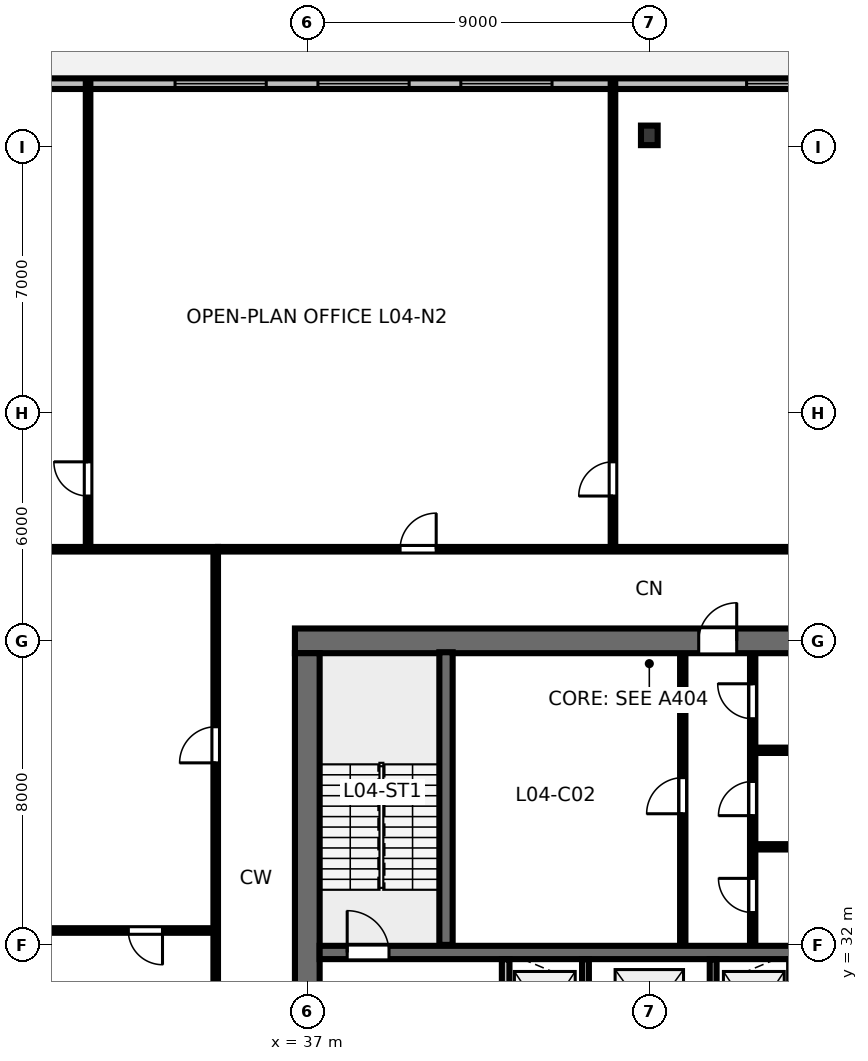
"""IFC4 building model, lengths in metres.
Left out: names, types, materials, properties, quantities, classifications, styles, units other than length and angle.
Written with IfcOpenShell. Run it as: python <this file> out.ifc"""

import sys

from ifc_helpers import new_model, si_unit, direction, frame, frame_2d, origin, origin_2d, place, context, subcontext, project, spatial, rectangle, i_section, extrude, element, fill, save


model = new_model("IFC4")
c1 = context("Model", 3, precision=1e-05, world=origin(), true_north=direction((0.0, 1.0)))
c2 = subcontext(c1, "Body", "Model", "MODEL_VIEW")
j1 = project(units=[si_unit("LENGTHUNIT", "METRE"), si_unit("PLANEANGLEUNIT", "RADIAN")], contexts=[c1])
p1 = place(None, origin())
s1 = spatial("IfcSite", under=j1, at=p1, CompositionType="ELEMENT")
p2 = place(p1, origin())
s2 = spatial("IfcBuilding", under=s1, at=p2, CompositionType="ELEMENT")
p3 = place(p2, frame((0.0, 0.0, 18.5)))
s3 = spatial("IfcBuildingStorey", under=s2, at=p3, CompositionType="ELEMENT", Elevation=18.5)
p4 = place(p3, frame((36.675, 40.0, 0.0), z_axis=(0.0, 0.0, 1.0), x_axis=(1.0, 0.0, 0.0)))
e1 = element("IfcWall", 1, at=p4, inside=s3, PredefinedType="SHEAR", context=c2, shape_type="SweptSolid", body=[
    extrude(rectangle(XDim=18.65, YDim=0.65, at=frame_2d((9.325, 0.0))), origin(), (0.0, 0.0, 1.0), 4.05),
])
p5 = place(p4, frame((10.625, 0.0, 0.0)))
e2 = element("IfcOpeningElement", 2, at=p5, cuts=e1, PredefinedType="OPENING", context=c2, shape_type="SweptSolid", body=[
    extrude(rectangle(XDim=1.0, YDim=2.15, at=frame_2d((0.5, 1.075))), frame((0.0, 0.335, 0.0), z_axis=(0.0, -1.0, 0.0), x_axis=(1.0, 0.0, 0.0)), (0.0, 0.0, 1.0), 0.67),
])
p6 = place(p3, frame((37.0, 24.325, 0.0), z_axis=(0.0, 0.0, 1.0), x_axis=(0.0, 1.0, 0.0)))
e3 = element("IfcWall", 3, at=p6, inside=s3, PredefinedType="SHEAR", context=c2, shape_type="SweptSolid", body=[
    extrude(rectangle(XDim=15.35, YDim=0.65, at=frame_2d((7.675, 0.0))), origin(), (0.0, 0.0, 1.0), 4.05),
])
p7 = place(p6, frame((5.2, 0.0, 0.0)))
e4 = element("IfcOpeningElement", 4, at=p7, cuts=e3, PredefinedType="OPENING", context=c2, shape_type="SweptSolid", body=[
    extrude(rectangle(XDim=1.15, YDim=2.15, at=frame_2d((0.575, 1.075))), frame((0.0, 0.335, 0.0), z_axis=(0.0, -1.0, 0.0), x_axis=(1.0, 0.0, 0.0)), (0.0, 0.0, 1.0), 0.67),
])
p8 = place(p3, frame((37.325, 31.8, 0.0), z_axis=(0.0, 0.0, 1.0), x_axis=(1.0, 0.0, 0.0)))
e5 = element("IfcWall", 5, at=p8, inside=s3, PredefinedType="SHEAR", context=c2, shape_type="SweptSolid", body=[
    extrude(rectangle(XDim=17.35, YDim=0.35, at=frame_2d((8.675, 0.0))), origin(), (0.0, 0.0, 1.0), 4.05),
])
p9 = place(p8, frame((0.725, 0.0, 0.0)))
e6 = element("IfcOpeningElement", 6, at=p9, cuts=e5, PredefinedType="OPENING", context=c2, shape_type="SweptSolid", body=[
    extrude(rectangle(XDim=1.1, YDim=2.15, at=frame_2d((0.55, 1.075))), frame((0.0, 0.185, 0.0), z_axis=(0.0, -1.0, 0.0), x_axis=(1.0, 0.0, 0.0)), (0.0, 0.0, 1.0), 0.37),
])
p10 = place(p8, frame((14.625, 0.0, 0.0)))
e7 = element("IfcOpeningElement", 7, at=p10, cuts=e5, PredefinedType="OPENING", context=c2, shape_type="SweptSolid", body=[
    extrude(rectangle(XDim=1.1, YDim=2.15, at=frame_2d((0.55, 1.075))), frame((0.0, 0.185, 0.0), z_axis=(0.0, -1.0, 0.0), x_axis=(1.0, 0.0, 0.0)), (0.0, 0.0, 1.0), 0.37),
])
p11 = place(p3, frame((46.0, 53.3, 0.0), z_axis=(0.0, 0.0, 1.0), x_axis=(1.0, 0.0, 0.0)))
e8 = element("IfcColumn", 8, at=p11, inside=s3, PredefinedType="COLUMN", context=c2, shape_type="SweptSolid", body=[
    extrude(i_section(OverallWidth=0.439, OverallDepth=0.514, WebThickness=0.06, FlangeThickness=0.097, FilletRadius=0.025, at=origin_2d()), origin(), (0.0, 0.0, 1.0), 4.048),
])
p12 = place(p3, frame((71.54, 54.66, 0.0), z_axis=(0.0, 0.0, 1.0), x_axis=(-1.0, 0.0, 0.0)))
e9 = element("IfcWall", 9, at=p12, inside=s3, PredefinedType="STANDARD", context=c2, shape_type="SweptSolid", body=[
    extrude(rectangle(XDim=51.08, YDim=0.28, at=frame_2d((25.54, 0.0))), origin(), (0.0, 0.0, 1.0), 4.05),
])
p13 = place(p12, frame((5.54, 0.0, 0.85)))
e10 = element("IfcOpeningElement", 10, at=p13, cuts=e9, PredefinedType="OPENING", context=c2, shape_type="SweptSolid", body=[
    extrude(rectangle(XDim=2.4, YDim=2.4, at=frame_2d((1.2, 1.2))), frame((0.0, 0.15, 0.0), z_axis=(0.0, -1.0, 0.0), x_axis=(1.0, 0.0, 0.0)), (0.0, 0.0, 1.0), 0.3),
])
p14 = place(p12, frame((13.06, 0.0, 0.85)))
e11 = element("IfcOpeningElement", 11, at=p14, cuts=e9, PredefinedType="OPENING", context=c2, shape_type="SweptSolid", body=[
    extrude(rectangle(XDim=2.4, YDim=2.4, at=frame_2d((1.2, 1.2))), frame((0.0, 0.15, 0.0), z_axis=(0.0, -1.0, 0.0), x_axis=(1.0, 0.0, 0.0)), (0.0, 0.0, 1.0), 0.3),
])
p15 = place(p12, frame((16.82, 0.0, 0.85)))
e12 = element("IfcOpeningElement", 12, at=p15, cuts=e9, PredefinedType="OPENING", context=c2, shape_type="SweptSolid", body=[
    extrude(rectangle(XDim=2.4, YDim=2.4, at=frame_2d((1.2, 1.2))), frame((0.0, 0.15, 0.0), z_axis=(0.0, -1.0, 0.0), x_axis=(1.0, 0.0, 0.0)), (0.0, 0.0, 1.0), 0.3),
])
p16 = place(p12, frame((20.58, 0.0, 0.85)))
e13 = element("IfcOpeningElement", 13, at=p16, cuts=e9, PredefinedType="OPENING", context=c2, shape_type="SweptSolid", body=[
    extrude(rectangle(XDim=2.4, YDim=2.4, at=frame_2d((1.2, 1.2))), frame((0.0, 0.15, 0.0), z_axis=(0.0, -1.0, 0.0), x_axis=(1.0, 0.0, 0.0)), (0.0, 0.0, 1.0), 0.3),
])
p17 = place(p12, frame((28.1, 0.0, 0.85)))
e14 = element("IfcOpeningElement", 14, at=p17, cuts=e9, PredefinedType="OPENING", context=c2, shape_type="SweptSolid", body=[
    extrude(rectangle(XDim=2.4, YDim=2.4, at=frame_2d((1.2, 1.2))), frame((0.0, 0.15, 0.0), z_axis=(0.0, -1.0, 0.0), x_axis=(1.0, 0.0, 0.0)), (0.0, 0.0, 1.0), 0.3),
])
p18 = place(p12, frame((31.86, 0.0, 0.85)))
e15 = element("IfcOpeningElement", 15, at=p18, cuts=e9, PredefinedType="OPENING", context=c2, shape_type="SweptSolid", body=[
    extrude(rectangle(XDim=2.4, YDim=2.4, at=frame_2d((1.2, 1.2))), frame((0.0, 0.15, 0.0), z_axis=(0.0, -1.0, 0.0), x_axis=(1.0, 0.0, 0.0)), (0.0, 0.0, 1.0), 0.3),
])
p19 = place(p12, frame((35.62, 0.0, 0.85)))
e16 = element("IfcOpeningElement", 16, at=p19, cuts=e9, PredefinedType="OPENING", context=c2, shape_type="SweptSolid", body=[
    extrude(rectangle(XDim=2.4, YDim=2.4, at=frame_2d((1.2, 1.2))), frame((0.0, 0.15, 0.0), z_axis=(0.0, -1.0, 0.0), x_axis=(1.0, 0.0, 0.0)), (0.0, 0.0, 1.0), 0.3),
])
p20 = place(p12, frame((43.14, 0.0, 0.85)))
e17 = element("IfcOpeningElement", 17, at=p20, cuts=e9, PredefinedType="OPENING", context=c2, shape_type="SweptSolid", body=[
    extrude(rectangle(XDim=2.4, YDim=2.4, at=frame_2d((1.2, 1.2))), frame((0.0, 0.15, 0.0), z_axis=(0.0, -1.0, 0.0), x_axis=(1.0, 0.0, 0.0)), (0.0, 0.0, 1.0), 0.3),
])
p21 = place(p3, frame((40.65, 32.0, 0.0), z_axis=(0.0, 0.0, 1.0), x_axis=(0.0, 1.0, 0.0)))
e18 = element("IfcWall", 18, at=p21, inside=s3, PredefinedType="SHEAR", context=c2, shape_type="SweptSolid", body=[
    extrude(rectangle(XDim=7.7, YDim=0.35, at=frame_2d((3.85, 0.0))), origin(), (0.0, 0.0, 1.0), 4.5),
])
p22 = place(p3, frame((46.88, 32.05, 0.0), z_axis=(0.0, 0.0, 1.0), x_axis=(0.0, 1.0, 0.0)))
e19 = element("IfcWall", 19, at=p22, inside=s3, PredefinedType="PARTITIONING", context=c2, shape_type="SweptSolid", body=[
    extrude(rectangle(XDim=7.6, YDim=0.14, at=frame_2d((3.8, 0.0))), origin(), (0.0, 0.0, 1.0), 4.05),
])
p23 = place(p22, frame((3.4, 0.0, 0.0)))
e20 = element("IfcOpeningElement", 20, at=p23, cuts=e19, PredefinedType="OPENING", context=c2, shape_type="SweptSolid", body=[
    extrude(rectangle(XDim=0.95, YDim=2.15, at=frame_2d((0.475, 1.075))), frame((0.0, 0.08, 0.0), z_axis=(0.0, -1.0, 0.0), x_axis=(1.0, 0.0, 0.0)), (0.0, 0.0, 1.0), 0.16),
])
p24 = place(p3, frame((48.72, 32.05, 0.0), z_axis=(0.0, 0.0, 1.0), x_axis=(0.0, 1.0, 0.0)))
e21 = element("IfcWall", 21, at=p24, inside=s3, PredefinedType="PARTITIONING", context=c2, shape_type="SweptSolid", body=[
    extrude(rectangle(XDim=7.6, YDim=0.14, at=frame_2d((3.8, 0.0))), origin(), (0.0, 0.0, 1.0), 4.05),
])
p25 = place(p24, frame((0.8, 0.0, 0.0)))
e22 = element("IfcOpeningElement", 22, at=p25, cuts=e21, PredefinedType="OPENING", context=c2, shape_type="SweptSolid", body=[
    extrude(rectangle(XDim=0.9, YDim=2.15, at=frame_2d((0.45, 1.075))), frame((0.0, 0.08, 0.0), z_axis=(0.0, -1.0, 0.0), x_axis=(1.0, 0.0, 0.0)), (0.0, 0.0, 1.0), 0.16),
])
p26 = place(p24, frame((3.35, 0.0, 0.0)))
e23 = element("IfcOpeningElement", 23, at=p26, cuts=e21, PredefinedType="OPENING", context=c2, shape_type="SweptSolid", body=[
    extrude(rectangle(XDim=0.9, YDim=2.15, at=frame_2d((0.45, 1.075))), frame((0.0, 0.08, 0.0), z_axis=(0.0, -1.0, 0.0), x_axis=(1.0, 0.0, 0.0)), (0.0, 0.0, 1.0), 0.16),
])
p27 = place(p24, frame((5.9, 0.0, 0.0)))
e24 = element("IfcOpeningElement", 24, at=p27, cuts=e21, PredefinedType="OPENING", context=c2, shape_type="SweptSolid", body=[
    extrude(rectangle(XDim=0.92, YDim=2.15, at=frame_2d((0.46, 1.075))), frame((0.0, 0.08, 0.0), z_axis=(0.0, -1.0, 0.0), x_axis=(1.0, 0.0, 0.0)), (0.0, 0.0, 1.0), 0.16),
])
for number, where, z_axis, x_axis in (
    (25, (48.8, 34.58, 0.0), (0.0, 0.0, 1.0), (1.0, 0.0, 0.0)),
    (26, (48.8, 37.12, 0.0), (0.0, 0.0, 1.0), (1.0, 0.0, 0.0)),
):
    element("IfcWall", number, at=place(p3, frame(where, z_axis=z_axis, x_axis=x_axis)), inside=s3, PredefinedType="PARTITIONING", context=c2, shape_type="SweptSolid", body=[
        extrude(rectangle(XDim=2.4, YDim=0.14, at=frame_2d((1.2, 0.0))), origin(), (0.0, 0.0, 1.0), 4.05),
    ])
p28 = place(p3, frame((42.22, 28.58, 0.0), z_axis=(0.0, 0.0, 1.0), x_axis=(0.0, 1.0, 0.0)))
e27 = element("IfcWall", 27, at=p28, inside=s3, PredefinedType="PARTITIONING", context=c2, shape_type="SweptSolid", body=[
    extrude(rectangle(XDim=3.04, YDim=0.2, at=frame_2d((1.52, 0.0))), origin(), (0.0, 0.0, 1.0), 4.05),
])
p29 = place(p28, frame((0.95, 0.0, 0.0)))
e28 = element("IfcOpeningElement", 28, at=p29, cuts=e27, PredefinedType="OPENING", context=c2, shape_type="SweptSolid", body=[
    extrude(rectangle(XDim=1.05, YDim=2.15, at=frame_2d((0.525, 1.075))), frame((0.0, 0.11, 0.0), z_axis=(0.0, -1.0, 0.0), x_axis=(1.0, 0.0, 0.0)), (0.0, 0.0, 1.0), 0.22),
])
for number, where, z_axis, x_axis in (
    (29, (44.32, 28.58, 0.0), (0.0, 0.0, 1.0), (0.0, 1.0, 0.0)),
    (30, (47.68, 28.58, 0.0), (0.0, 0.0, 1.0), (0.0, 1.0, 0.0)),
):
    element("IfcWall", number, at=place(p3, frame(where, z_axis=z_axis, x_axis=x_axis)), inside=s3, PredefinedType="PARTITIONING", context=c2, shape_type="SweptSolid", body=[
        extrude(rectangle(XDim=3.04, YDim=0.18, at=frame_2d((1.52, 0.0))), origin(), (0.0, 0.0, 1.0), 4.05),
    ])
p30 = place(p3, frame((31.232, 42.41, 0.0), z_axis=(0.0, 0.0, 1.0), x_axis=(0.0, 1.0, 0.0)))
e31 = element("IfcWall", 31, at=p30, inside=s3, PredefinedType="PARTITIONING", context=c2, shape_type="SweptSolid", body=[
    extrude(rectangle(XDim=12.25, YDim=0.12, at=frame_2d((6.125, 0.0))), origin(), (0.0, 0.0, 1.0), 2.89),
])
p31 = place(p30, frame((1.4, 0.0, 0.0)))
e32 = element("IfcOpeningElement", 32, at=p31, cuts=e31, PredefinedType="OPENING", context=c2, shape_type="SweptSolid", body=[
    extrude(rectangle(XDim=0.9, YDim=2.15, at=frame_2d((0.45, 1.075))), frame((0.0, 0.07, 0.0), z_axis=(0.0, -1.0, 0.0), x_axis=(1.0, 0.0, 0.0)), (0.0, 0.0, 1.0), 0.14),
])
p32 = place(p3, frame((45.044, 42.41, 0.0), z_axis=(0.0, 0.0, 1.0), x_axis=(0.0, 1.0, 0.0)))
e33 = element("IfcWall", 33, at=p32, inside=s3, PredefinedType="PARTITIONING", context=c2, shape_type="SweptSolid", body=[
    extrude(rectangle(XDim=12.25, YDim=0.12, at=frame_2d((6.125, 0.0))), origin(), (0.0, 0.0, 1.0), 2.89),
])
p33 = place(p32, frame((1.4, 0.0, 0.0)))
e34 = element("IfcOpeningElement", 34, at=p33, cuts=e33, PredefinedType="OPENING", context=c2, shape_type="SweptSolid", body=[
    extrude(rectangle(XDim=0.9, YDim=2.15, at=frame_2d((0.45, 1.075))), frame((0.0, 0.07, 0.0), z_axis=(0.0, -1.0, 0.0), x_axis=(1.0, 0.0, 0.0)), (0.0, 0.0, 1.0), 0.14),
])
p34 = place(p3, frame((34.65, 42.41, 0.0), z_axis=(0.0, 0.0, 1.0), x_axis=(1.0, 0.0, 0.0)))
e35 = element("IfcWall", 35, at=p34, inside=s3, PredefinedType="PARTITIONING", context=c2, shape_type="SweptSolid", body=[
    extrude(rectangle(XDim=22.7, YDim=0.12, at=frame_2d((11.35, 0.0))), origin(), (0.0, 0.0, 1.0), 2.89),
])
p35 = place(p34, frame((4.792, 0.0, 0.0)))
e36 = element("IfcOpeningElement", 36, at=p35, cuts=e35, PredefinedType="OPENING", context=c2, shape_type="SweptSolid", body=[
    extrude(rectangle(XDim=0.95, YDim=2.15, at=frame_2d((0.475, 1.075))), frame((0.0, 0.07, 0.0), z_axis=(0.0, -1.0, 0.0), x_axis=(1.0, 0.0, 0.0)), (0.0, 0.0, 1.0), 0.14),
])
p36 = place(p34, frame((16.002, 0.0, 0.0)))
e37 = element("IfcOpeningElement", 37, at=p36, cuts=e35, PredefinedType="OPENING", context=c2, shape_type="SweptSolid", body=[
    extrude(rectangle(XDim=0.95, YDim=2.15, at=frame_2d((0.475, 1.075))), frame((0.0, 0.07, 0.0), z_axis=(0.0, -1.0, 0.0), x_axis=(1.0, 0.0, 0.0)), (0.0, 0.0, 1.0), 0.14),
])
p37 = place(p3, frame((34.59, 32.378, 0.0), z_axis=(0.0, 0.0, 1.0), x_axis=(-1.0, 0.0, 0.0)))
e38 = element("IfcWall", 38, at=p37, inside=s3, PredefinedType="PARTITIONING", context=c2, shape_type="SweptSolid", body=[
    extrude(rectangle(XDim=6.24, YDim=0.12, at=frame_2d((3.12, 0.0))), origin(), (0.0, 0.0, 1.0), 2.89),
])
p38 = place(p37, frame((1.4, 0.0, 0.0)))
e39 = element("IfcOpeningElement", 39, at=p38, cuts=e38, PredefinedType="OPENING", context=c2, shape_type="SweptSolid", body=[
    extrude(rectangle(XDim=0.9, YDim=2.15, at=frame_2d((0.45, 1.075))), frame((0.0, 0.07, 0.0), z_axis=(0.0, -1.0, 0.0), x_axis=(1.0, 0.0, 0.0)), (0.0, 0.0, 1.0), 0.14),
])
p39 = place(p3, frame((34.59, 21.65, 0.0), z_axis=(0.0, 0.0, 1.0), x_axis=(0.0, 1.0, 0.0)))
e40 = element("IfcWall", 40, at=p39, inside=s3, PredefinedType="PARTITIONING", context=c2, shape_type="SweptSolid", body=[
    extrude(rectangle(XDim=20.7, YDim=0.12, at=frame_2d((10.35, 0.0))), origin(), (0.0, 0.0, 1.0), 2.89),
])
p40 = place(p39, frame((2.105, 0.0, 0.0)))
e41 = element("IfcOpeningElement", 41, at=p40, cuts=e40, PredefinedType="OPENING", context=c2, shape_type="SweptSolid", body=[
    extrude(rectangle(XDim=0.95, YDim=2.15, at=frame_2d((0.475, 1.075))), frame((0.0, 0.07, 0.0), z_axis=(0.0, -1.0, 0.0), x_axis=(1.0, 0.0, 0.0)), (0.0, 0.0, 1.0), 0.14),
])
p41 = place(p39, frame((7.369, 0.0, 0.0)))
e42 = element("IfcOpeningElement", 42, at=p41, cuts=e40, PredefinedType="OPENING", context=c2, shape_type="SweptSolid", body=[
    extrude(rectangle(XDim=0.95, YDim=2.15, at=frame_2d((0.475, 1.075))), frame((0.0, 0.07, 0.0), z_axis=(0.0, -1.0, 0.0), x_axis=(1.0, 0.0, 0.0)), (0.0, 0.0, 1.0), 0.14),
])
p42 = place(p39, frame((15.139, 0.0, 0.0)))
e43 = element("IfcOpeningElement", 43, at=p42, cuts=e40, PredefinedType="OPENING", context=c2, shape_type="SweptSolid", body=[
    extrude(rectangle(XDim=0.95, YDim=2.15, at=frame_2d((0.475, 1.075))), frame((0.0, 0.07, 0.0), z_axis=(0.0, -1.0, 0.0), x_axis=(1.0, 0.0, 0.0)), (0.0, 0.0, 1.0), 0.14),
])
p43 = place(p3, frame((34.65, 42.41, 0.0), z_axis=(0.0, 0.0, 1.0), x_axis=(-1.0, 0.0, 0.0)))
e44 = element("IfcWall", 44, at=p43, inside=s3, PredefinedType="PARTITIONING", context=c2, shape_type="SweptSolid", body=[
    extrude(rectangle(XDim=18.71, YDim=0.12, at=frame_2d((9.355, 0.0))), origin(), (0.0, 0.0, 1.0), 2.89),
])
p44 = place(p16, origin())
e45 = element("IfcWindow", 45, at=p44, inside=s3, PartitioningType="SINGLE_PANEL", PredefinedType="WINDOW", context=c2, shape_type="SweptSolid", body=[
    extrude(rectangle(XDim=2.4, YDim=2.4, at=frame_2d((1.2, 1.2))), frame((0.0, 0.03, 0.0), z_axis=(0.0, -1.0, 0.0), x_axis=(1.0, 0.0, 0.0)), (0.0, 0.0, 1.0), 0.06),
])
fill(e13, e45)
p45 = place(p17, origin())
e46 = element("IfcWindow", 46, at=p45, inside=s3, PartitioningType="SINGLE_PANEL", PredefinedType="WINDOW", context=c2, shape_type="SweptSolid", body=[
    extrude(rectangle(XDim=2.4, YDim=2.4, at=frame_2d((1.2, 1.2))), frame((0.0, 0.03, 0.0), z_axis=(0.0, -1.0, 0.0), x_axis=(1.0, 0.0, 0.0)), (0.0, 0.0, 1.0), 0.06),
])
fill(e14, e46)
p46 = place(p18, origin())
e47 = element("IfcWindow", 47, at=p46, inside=s3, PartitioningType="SINGLE_PANEL", PredefinedType="WINDOW", context=c2, shape_type="SweptSolid", body=[
    extrude(rectangle(XDim=2.4, YDim=2.4, at=frame_2d((1.2, 1.2))), frame((0.0, 0.03, 0.0), z_axis=(0.0, -1.0, 0.0), x_axis=(1.0, 0.0, 0.0)), (0.0, 0.0, 1.0), 0.06),
])
fill(e15, e47)
p47 = place(p19, origin())
e48 = element("IfcWindow", 48, at=p47, inside=s3, PartitioningType="SINGLE_PANEL", PredefinedType="WINDOW", context=c2, shape_type="SweptSolid", body=[
    extrude(rectangle(XDim=2.4, YDim=2.4, at=frame_2d((1.2, 1.2))), frame((0.0, 0.03, 0.0), z_axis=(0.0, -1.0, 0.0), x_axis=(1.0, 0.0, 0.0)), (0.0, 0.0, 1.0), 0.06),
])
fill(e16, e48)
p48 = place(p9, origin())
e49 = element("IfcDoor", 49, at=p48, inside=s3, OperationType="SINGLE_SWING_LEFT", PredefinedType="DOOR", context=c2, shape_type="SweptSolid", body=[
    extrude(rectangle(XDim=1.1, YDim=2.15, at=frame_2d((0.55, 1.075))), frame((0.0, 0.025, 0.0), z_axis=(0.0, -1.0, 0.0), x_axis=(1.0, 0.0, 0.0)), (0.0, 0.0, 1.0), 0.05),
])
fill(e6, e49)
p49 = place(p5, origin())
e50 = element("IfcDoor", 50, at=p49, inside=s3, OperationType="SINGLE_SWING_RIGHT", PredefinedType="DOOR", context=c2, shape_type="SweptSolid", body=[
    extrude(rectangle(XDim=1.0, YDim=2.15, at=frame_2d((0.5, 1.075))), frame((0.0, 0.025, 0.0), z_axis=(0.0, -1.0, 0.0), x_axis=(1.0, 0.0, 0.0)), (0.0, 0.0, 1.0), 0.05),
])
fill(e2, e50)
p50 = place(p23, origin())
e51 = element("IfcDoor", 51, at=p50, inside=s3, OperationType="SINGLE_SWING_LEFT", PredefinedType="DOOR", context=c2, shape_type="SweptSolid", body=[
    extrude(rectangle(XDim=0.95, YDim=2.15, at=frame_2d((0.475, 1.075))), frame((0.0, 0.025, 0.0), z_axis=(0.0, -1.0, 0.0), x_axis=(1.0, 0.0, 0.0)), (0.0, 0.0, 1.0), 0.05),
])
fill(e20, e51)
p51 = place(p25, origin())
e52 = element("IfcDoor", 52, at=p51, inside=s3, OperationType="SINGLE_SWING_RIGHT", PredefinedType="DOOR", context=c2, shape_type="SweptSolid", body=[
    extrude(rectangle(XDim=0.9, YDim=2.15, at=frame_2d((0.45, 1.075))), frame((0.0, 0.025, 0.0), z_axis=(0.0, -1.0, 0.0), x_axis=(1.0, 0.0, 0.0)), (0.0, 0.0, 1.0), 0.05),
])
fill(e22, e52)
p52 = place(p26, origin())
e53 = element("IfcDoor", 53, at=p52, inside=s3, OperationType="SINGLE_SWING_LEFT", PredefinedType="DOOR", context=c2, shape_type="SweptSolid", body=[
    extrude(rectangle(XDim=0.9, YDim=2.15, at=frame_2d((0.45, 1.075))), frame((0.0, 0.025, 0.0), z_axis=(0.0, -1.0, 0.0), x_axis=(1.0, 0.0, 0.0)), (0.0, 0.0, 1.0), 0.05),
])
fill(e23, e53)
p53 = place(p27, origin())
e54 = element("IfcDoor", 54, at=p53, inside=s3, OperationType="SINGLE_SWING_RIGHT", PredefinedType="DOOR", context=c2, shape_type="SweptSolid", body=[
    extrude(rectangle(XDim=0.92, YDim=2.15, at=frame_2d((0.46, 1.075))), frame((0.0, 0.025, 0.0), z_axis=(0.0, -1.0, 0.0), x_axis=(1.0, 0.0, 0.0)), (0.0, 0.0, 1.0), 0.05),
])
fill(e24, e54)
p54 = place(p31, origin())
e55 = element("IfcDoor", 55, at=p54, inside=s3, OperationType="SINGLE_SWING_RIGHT", PredefinedType="DOOR", context=c2, shape_type="SweptSolid", body=[
    extrude(rectangle(XDim=0.9, YDim=2.15, at=frame_2d((0.45, 1.075))), frame((0.0, 0.025, 0.0), z_axis=(0.0, -1.0, 0.0), x_axis=(1.0, 0.0, 0.0)), (0.0, 0.0, 1.0), 0.05),
])
fill(e32, e55)
p55 = place(p33, origin())
e56 = element("IfcDoor", 56, at=p55, inside=s3, OperationType="SINGLE_SWING_LEFT", PredefinedType="DOOR", context=c2, shape_type="SweptSolid", body=[
    extrude(rectangle(XDim=0.9, YDim=2.15, at=frame_2d((0.45, 1.075))), frame((0.0, 0.025, 0.0), z_axis=(0.0, -1.0, 0.0), x_axis=(1.0, 0.0, 0.0)), (0.0, 0.0, 1.0), 0.05),
])
fill(e34, e56)
p56 = place(p35, origin())
e57 = element("IfcDoor", 57, at=p56, inside=s3, OperationType="SINGLE_SWING_RIGHT", PredefinedType="DOOR", context=c2, shape_type="SweptSolid", body=[
    extrude(rectangle(XDim=0.95, YDim=2.15, at=frame_2d((0.475, 1.075))), frame((0.0, 0.025, 0.0), z_axis=(0.0, -1.0, 0.0), x_axis=(1.0, 0.0, 0.0)), (0.0, 0.0, 1.0), 0.05),
])
fill(e36, e57)
p57 = place(p38, origin())
e58 = element("IfcDoor", 58, at=p57, inside=s3, OperationType="SINGLE_SWING_LEFT", PredefinedType="DOOR", context=c2, shape_type="SweptSolid", body=[
    extrude(rectangle(XDim=0.9, YDim=2.15, at=frame_2d((0.45, 1.075))), frame((0.0, 0.025, 0.0), z_axis=(0.0, -1.0, 0.0), x_axis=(1.0, 0.0, 0.0)), (0.0, 0.0, 1.0), 0.05),
])
fill(e39, e58)
p58 = place(p42, origin())
e59 = element("IfcDoor", 59, at=p58, inside=s3, OperationType="SINGLE_SWING_LEFT", PredefinedType="DOOR", context=c2, shape_type="SweptSolid", body=[
    extrude(rectangle(XDim=0.95, YDim=2.15, at=frame_2d((0.475, 1.075))), frame((0.0, 0.025, 0.0), z_axis=(0.0, -1.0, 0.0), x_axis=(1.0, 0.0, 0.0)), (0.0, 0.0, 1.0), 0.05),
])
fill(e43, e59)
save(model, sys.argv[1])
